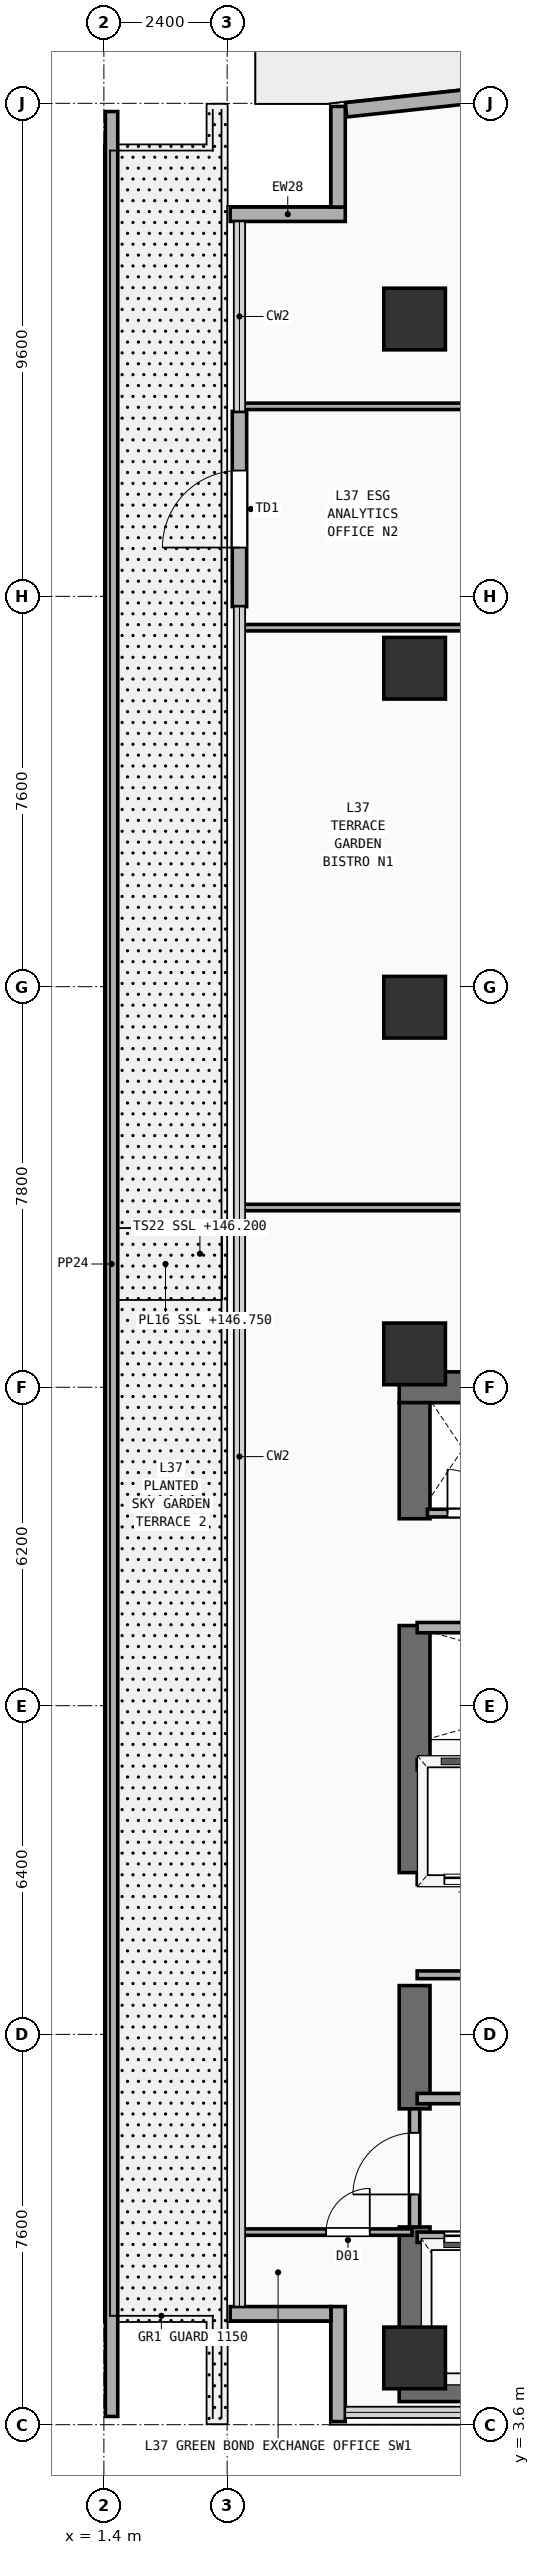
"""IFC4 building model, lengths in metres.
Left out: names, types, materials, properties, quantities, classifications, styles, units other than length and angle.
Written with IfcOpenShell. Run it as: python <this file> out.ifc"""

import sys

from ifc_helpers import new_model, si_unit, direction, frame, frame_2d, origin, origin_2d, place, context, subcontext, project, spatial, rectangle, extrude, element, fill, save


model = new_model("IFC4")
c1 = context("Model", 3, precision=1e-05, world=origin(), true_north=direction((0.0, 1.0)))
c2 = subcontext(c1, "Body", "Model", "MODEL_VIEW")
j1 = project(units=[si_unit("LENGTHUNIT", "METRE"), si_unit("PLANEANGLEUNIT", "RADIAN")], contexts=[c1])
p1 = place(None, origin())
s1 = spatial("IfcSite", under=j1, at=p1, CompositionType="ELEMENT")
p2 = place(p1, origin())
s2 = spatial("IfcBuilding", under=s1, at=p2, CompositionType="ELEMENT")
p3 = place(p2, frame((0.0, 0.0, 146.2)))
s3 = spatial("IfcBuildingStorey", under=s2, at=p3, CompositionType="ELEMENT", Elevation=146.2)
for number, where, z_axis, x_axis in (
    (1, (7.15, 4.35, 0.0), (0.0, 0.0, 1.0), (1.0, 0.0, 0.0)),
    (2, (7.15, 23.8, 0.0), (0.0, 0.0, 1.0), (1.0, 0.0, 0.0)),
):
    element("IfcWall", number, at=place(p3, frame(where, z_axis=z_axis, x_axis=x_axis)), inside=s3, PredefinedType="SHEAR", context=c2, shape_type="SweptSolid", body=[
        extrude(rectangle(XDim=13.95, YDim=0.6, at=frame_2d((6.975, 0.0))), origin(), (0.0, 0.0, 1.0), 3.56),
    ])
p4 = place(p3, frame((7.45, 4.65, 0.0), z_axis=(0.0, 0.0, 1.0), x_axis=(0.0, 1.0, 0.0)))
e3 = element("IfcWall", 3, at=p4, inside=s3, PredefinedType="SHEAR", context=c2, shape_type="SweptSolid", body=[
    extrude(rectangle(XDim=2.8, YDim=0.6, at=frame_2d((1.4, 0.0))), origin(), (0.0, 0.0, 1.0), 3.56),
])
p5 = place(p3, frame((7.45, 9.75, 0.0), z_axis=(0.0, 0.0, 1.0), x_axis=(0.0, 1.0, 0.0)))
e4 = element("IfcWall", 4, at=p5, inside=s3, PredefinedType="SHEAR", context=c2, shape_type="SweptSolid", body=[
    extrude(rectangle(XDim=2.4, YDim=0.6, at=frame_2d((1.2, 0.0))), origin(), (0.0, 0.0, 1.0), 3.56),
])
p6 = place(p3, frame((7.45, 14.35, 0.0), z_axis=(0.0, 0.0, 1.0), x_axis=(0.0, 1.0, 0.0)))
e5 = element("IfcWall", 5, at=p6, inside=s3, PredefinedType="SHEAR", context=c2, shape_type="SweptSolid", body=[
    extrude(rectangle(XDim=4.81, YDim=0.6, at=frame_2d((2.405, 0.0))), origin(), (0.0, 0.0, 1.0), 3.56),
])
p7 = place(p3, frame((7.45, 21.24, 0.0), z_axis=(0.0, 0.0, 1.0), x_axis=(0.0, 1.0, 0.0)))
e6 = element("IfcWall", 6, at=p7, inside=s3, PredefinedType="SHEAR", context=c2, shape_type="SweptSolid", body=[
    extrude(rectangle(XDim=2.26, YDim=0.6, at=frame_2d((1.13, 0.0))), origin(), (0.0, 0.0, 1.0), 3.56),
])
for number, where, z_axis, x_axis in (
    (7, (7.45, 4.9, 0.0), (0.0, 0.0, 1.0), (1.0, 0.0, 0.0)),
    (8, (7.45, 24.45, 0.0), (0.0, 0.0, 1.0), (1.0, 0.0, 0.0)),
    (9, (7.45, 31.2, 0.0), (0.0, 0.0, 1.0), (1.0, 0.0, 0.0)),
    (10, (7.45, 37.8, 0.0), (0.0, 0.0, 1.0), (1.0, 0.0, 0.0)),
    (11, (7.45, 44.6, 0.0), (0.0, 0.0, 1.0), (1.0, 0.0, 0.0)),
):
    element("IfcColumn", number, at=place(p3, frame(where, z_axis=z_axis, x_axis=x_axis)), inside=s3, PredefinedType="COLUMN", context=c2, shape_type="SweptSolid", body=[
        extrude(rectangle(XDim=1.2, YDim=1.2, at=origin_2d()), origin(), (0.0, 0.0, 1.0), 3.56),
    ])
p8 = place(p3, frame((4.04, 39.0, 0.0), z_axis=(0.0, 0.0, 1.0), x_axis=(0.0, 1.0, 0.0)))
e12 = element("IfcWall", 12, at=p8, inside=s3, PredefinedType="SOLIDWALL", context=c2, shape_type="SweptSolid", body=[
    extrude(rectangle(XDim=3.8, YDim=0.28, at=frame_2d((1.9, 0.0))), origin(), (0.0, 0.0, 1.0), 3.56),
])
p9 = place(p8, frame((1.15, 0.0, 0.0)))
e13 = element("IfcOpeningElement", 13, at=p9, cuts=e12, PredefinedType="OPENING", context=c2, shape_type="SweptSolid", body=[
    extrude(rectangle(XDim=1.5, YDim=2.25, at=frame_2d((0.75, 1.125))), frame((0.0, 0.15, 0.0), z_axis=(0.0, -1.0, 0.0), x_axis=(1.0, 0.0, 0.0)), (0.0, 0.0, 1.0), 0.3),
])
p10 = place(p3, frame((1.55, 3.76, 0.0), z_axis=(0.0, 0.0, 1.0), x_axis=(0.0, 1.0, 0.0)))
e14 = element("IfcWall", 14, at=p10, inside=s3, PredefinedType="PARAPET", context=c2, shape_type="SweptSolid", body=[
    extrude(rectangle(XDim=44.88, YDim=0.24, at=frame_2d((22.44, 0.0))), origin(), (0.0, 0.0, 1.0), 0.42),
])
p11 = place(p3, frame((5.96, 3.66, 0.0), z_axis=(0.0, 0.0, 1.0), x_axis=(0.0, 1.0, 0.0)))
e15 = element("IfcWall", 15, at=p11, inside=s3, PredefinedType="SOLIDWALL", context=c2, shape_type="SweptSolid", body=[
    extrude(rectangle(XDim=2.24, YDim=0.28, at=frame_2d((1.12, 0.0))), origin(), (0.0, 0.0, 1.0), 3.56),
])
p12 = place(p3, frame((3.86, 5.76, 0.0), z_axis=(0.0, 0.0, 1.0), x_axis=(1.0, 0.0, 0.0)))
e16 = element("IfcWall", 16, at=p12, inside=s3, PredefinedType="SOLIDWALL", context=c2, shape_type="SweptSolid", body=[
    extrude(rectangle(XDim=1.96, YDim=0.28, at=frame_2d((0.98, 0.0))), origin(), (0.0, 0.0, 1.0), 3.56),
])
p13 = place(p3, frame((3.86, 46.64, 0.0), z_axis=(0.0, 0.0, 1.0), x_axis=(1.0, 0.0, 0.0)))
e17 = element("IfcWall", 17, at=p13, inside=s3, PredefinedType="SOLIDWALL", context=c2, shape_type="SweptSolid", body=[
    extrude(rectangle(XDim=2.24, YDim=0.28, at=frame_2d((1.12, 0.0))), origin(), (0.0, 0.0, 1.0), 3.56),
])
p14 = place(p3, frame((5.96, 46.78, 0.0), z_axis=(0.0, 0.0, 1.0), x_axis=(0.0, 1.0, 0.0)))
e18 = element("IfcWall", 18, at=p14, inside=s3, PredefinedType="SOLIDWALL", context=c2, shape_type="SweptSolid", body=[
    extrude(rectangle(XDim=1.96, YDim=0.28, at=frame_2d((0.98, 0.0))), origin(), (0.0, 0.0, 1.0), 3.56),
])
p15 = place(p3, frame((13.197, 49.439, 0.0), z_axis=(0.0, 0.0, 1.0), x_axis=(-0.994206651606, -0.107485505548, 0.0)))
e19 = element("IfcWall", 19, at=p15, inside=s3, PredefinedType="SOLIDWALL", context=c2, shape_type="SweptSolid", body=[
    extrude(rectangle(XDim=7.123, YDim=0.28, at=frame_2d((3.562, 0.0))), origin(), (0.0, 0.0, 1.0), 3.56),
])
p16 = place(p3, frame((7.5, 7.25, 0.0), z_axis=(0.0, 0.0, 1.0), x_axis=(1.0, 0.0, 0.0)))
e20 = element("IfcWall", 20, at=p16, inside=s3, PredefinedType="PARTITIONING", context=c2, shape_type="SweptSolid", body=[
    extrude(rectangle(XDim=8.35, YDim=0.2, at=frame_2d((4.175, 0.0))), origin(), (0.0, 0.0, 1.0), 3.56),
])
p17 = place(p16, frame((0.53, 0.0, 0.0)))
e21 = element("IfcOpeningElement", 21, at=p17, cuts=e20, PredefinedType="OPENING", context=c2, shape_type="SweptSolid", body=[
    extrude(rectangle(XDim=1.1, YDim=2.2, at=frame_2d((0.55, 1.1))), frame((0.0, 0.11, 0.0), z_axis=(0.0, -1.0, 0.0), x_axis=(1.0, 0.0, 0.0)), (0.0, 0.0, 1.0), 0.22),
])
p18 = place(p16, frame((2.37, 0.0, 0.0)))
e22 = element("IfcOpeningElement", 22, at=p18, cuts=e20, PredefinedType="OPENING", context=c2, shape_type="SweptSolid", body=[
    extrude(rectangle(XDim=1.1, YDim=2.2, at=frame_2d((0.55, 1.1))), frame((0.0, 0.11, 0.0), z_axis=(0.0, -1.0, 0.0), x_axis=(1.0, 0.0, 0.0)), (0.0, 0.0, 1.0), 0.22),
])
p19 = place(p16, frame((4.33, 0.0, 0.0)))
e23 = element("IfcOpeningElement", 23, at=p19, cuts=e20, PredefinedType="OPENING", context=c2, shape_type="SweptSolid", body=[
    extrude(rectangle(XDim=1.1, YDim=2.2, at=frame_2d((0.55, 1.1))), frame((0.0, 0.11, 0.0), z_axis=(0.0, -1.0, 0.0), x_axis=(1.0, 0.0, 0.0)), (0.0, 0.0, 1.0), 0.22),
])
p20 = place(p16, frame((6.5, 0.0, 0.0)))
e24 = element("IfcOpeningElement", 24, at=p20, cuts=e20, PredefinedType="OPENING", context=c2, shape_type="SweptSolid", body=[
    extrude(rectangle(XDim=1.1, YDim=2.2, at=frame_2d((0.55, 1.1))), frame((0.0, 0.11, 0.0), z_axis=(0.0, -1.0, 0.0), x_axis=(1.0, 0.0, 0.0)), (0.0, 0.0, 1.0), 0.22),
])
p21 = place(p3, frame((7.5, 9.95, 0.0), z_axis=(0.0, 0.0, 1.0), x_axis=(1.0, 0.0, 0.0)))
e25 = element("IfcWall", 25, at=p21, inside=s3, PredefinedType="PARTITIONING", context=c2, shape_type="SweptSolid", body=[
    extrude(rectangle(XDim=8.35, YDim=0.2, at=frame_2d((4.175, 0.0))), origin(), (0.0, 0.0, 1.0), 3.56),
])
p22 = place(p3, frame((7.45, 7.45, 0.0), z_axis=(0.0, 0.0, 1.0), x_axis=(0.0, 1.0, 0.0)))
e26 = element("IfcWall", 26, at=p22, inside=s3, PredefinedType="PARTITIONING", context=c2, shape_type="SweptSolid", body=[
    extrude(rectangle(XDim=2.3, YDim=0.2, at=frame_2d((1.15, 0.0))), origin(), (0.0, 0.0, 1.0), 2.54),
])
p23 = place(p22, frame((0.633, 0.0, 0.0)))
e27 = element("IfcOpeningElement", 27, at=p23, cuts=e26, PredefinedType="OPENING", context=c2, shape_type="SweptSolid", body=[
    extrude(rectangle(XDim=1.2, YDim=2.25, at=frame_2d((0.6, 1.125))), frame((0.0, 0.11, 0.0), z_axis=(0.0, -1.0, 0.0), x_axis=(1.0, 0.0, 0.0)), (0.0, 0.0, 1.0), 0.22),
])
p24 = place(p3, frame((7.5, 12.36, 0.0), z_axis=(0.0, 0.0, 1.0), x_axis=(1.0, 0.0, 0.0)))
e28 = element("IfcWall", 28, at=p24, inside=s3, PredefinedType="PARTITIONING", context=c2, shape_type="SweptSolid", body=[
    extrude(rectangle(XDim=7.85, YDim=0.15, at=frame_2d((3.925, 0.0))), origin(), (0.0, 0.0, 1.0), 3.56),
])
p25 = place(p24, frame((2.202, 0.0, 0.0)))
e29 = element("IfcOpeningElement", 29, at=p25, cuts=e28, PredefinedType="OPENING", context=c2, shape_type="SweptSolid", body=[
    extrude(rectangle(XDim=0.85, YDim=2.15, at=frame_2d((0.425, 1.075))), frame((0.0, 0.085, 0.0), z_axis=(0.0, -1.0, 0.0), x_axis=(1.0, 0.0, 0.0)), (0.0, 0.0, 1.0), 0.17),
])
p26 = place(p24, frame((6.025, 0.0, 0.0)))
e30 = element("IfcOpeningElement", 30, at=p26, cuts=e28, PredefinedType="OPENING", context=c2, shape_type="SweptSolid", body=[
    extrude(rectangle(XDim=0.85, YDim=2.15, at=frame_2d((0.425, 1.075))), frame((0.0, 0.085, 0.0), z_axis=(0.0, -1.0, 0.0), x_axis=(1.0, 0.0, 0.0)), (0.0, 0.0, 1.0), 0.17),
])
p27 = place(p3, frame((7.5, 14.22, 0.0), z_axis=(0.0, 0.0, 1.0), x_axis=(1.0, 0.0, 0.0)))
e31 = element("IfcWall", 31, at=p27, inside=s3, PredefinedType="PARTITIONING", context=c2, shape_type="SweptSolid", body=[
    extrude(rectangle(XDim=7.85, YDim=0.2, at=frame_2d((3.925, 0.0))), origin(), (0.0, 0.0, 1.0), 3.56),
])
p28 = place(p27, frame((0.53, 0.0, 0.0)))
e32 = element("IfcOpeningElement", 32, at=p28, cuts=e31, PredefinedType="OPENING", context=c2, shape_type="SweptSolid", body=[
    extrude(rectangle(XDim=1.1, YDim=2.2, at=frame_2d((0.55, 1.1))), frame((0.0, 0.11, 0.0), z_axis=(0.0, -1.0, 0.0), x_axis=(1.0, 0.0, 0.0)), (0.0, 0.0, 1.0), 0.22),
])
p29 = place(p27, frame((2.42, 0.0, 0.0)))
e33 = element("IfcOpeningElement", 33, at=p29, cuts=e31, PredefinedType="OPENING", context=c2, shape_type="SweptSolid", body=[
    extrude(rectangle(XDim=1.1, YDim=2.2, at=frame_2d((0.55, 1.1))), frame((0.0, 0.11, 0.0), z_axis=(0.0, -1.0, 0.0), x_axis=(1.0, 0.0, 0.0)), (0.0, 0.0, 1.0), 0.22),
])
p30 = place(p27, frame((4.31, 0.0, 0.0)))
e34 = element("IfcOpeningElement", 34, at=p30, cuts=e31, PredefinedType="OPENING", context=c2, shape_type="SweptSolid", body=[
    extrude(rectangle(XDim=1.1, YDim=2.2, at=frame_2d((0.55, 1.1))), frame((0.0, 0.11, 0.0), z_axis=(0.0, -1.0, 0.0), x_axis=(1.0, 0.0, 0.0)), (0.0, 0.0, 1.0), 0.22),
])
p31 = place(p27, frame((6.2, 0.0, 0.0)))
e35 = element("IfcOpeningElement", 35, at=p31, cuts=e31, PredefinedType="OPENING", context=c2, shape_type="SweptSolid", body=[
    extrude(rectangle(XDim=1.1, YDim=2.2, at=frame_2d((0.55, 1.1))), frame((0.0, 0.11, 0.0), z_axis=(0.0, -1.0, 0.0), x_axis=(1.0, 0.0, 0.0)), (0.0, 0.0, 1.0), 0.22),
])
for number, where, z_axis, x_axis in (
    (36, (7.5, 16.45, 0.0), (0.0, 0.0, 1.0), (1.0, 0.0, 0.0)),
    (37, (7.5, 19.12, 0.0), (0.0, 0.0, 1.0), (1.0, 0.0, 0.0)),
):
    element("IfcWall", number, at=place(p3, frame(where, z_axis=z_axis, x_axis=x_axis)), inside=s3, PredefinedType="PARTITIONING", context=c2, shape_type="SweptSolid", body=[
        extrude(rectangle(XDim=7.85, YDim=0.2, at=frame_2d((3.925, 0.0))), origin(), (0.0, 0.0, 1.0), 3.56),
    ])
p32 = place(p3, frame((7.7, 21.35, 0.0), z_axis=(0.0, 0.0, 1.0), x_axis=(1.0, 0.0, 0.0)))
e38 = element("IfcWall", 38, at=p32, inside=s3, PredefinedType="PARTITIONING", context=c2, shape_type="SweptSolid", body=[
    extrude(rectangle(XDim=1.55, YDim=0.15, at=frame_2d((0.775, 0.0))), origin(), (0.0, 0.0, 1.0), 3.56),
])
p33 = place(p32, frame((0.39, 0.0, 0.0)))
e39 = element("IfcOpeningElement", 39, at=p33, cuts=e38, PredefinedType="OPENING", context=c2, shape_type="SweptSolid", body=[
    extrude(rectangle(XDim=0.85, YDim=2.15, at=frame_2d((0.425, 1.075))), frame((0.0, 0.085, 0.0), z_axis=(0.0, -1.0, 0.0), x_axis=(1.0, 0.0, 0.0)), (0.0, 0.0, 1.0), 0.17),
])
p34 = place(p3, frame((4.04, 7.35, 0.0), z_axis=(0.0, 0.0, 1.0), x_axis=(1.0, 0.0, 0.0)))
e40 = element("IfcWall", 40, at=p34, inside=s3, PredefinedType="PARTITIONING", context=c2, shape_type="SweptSolid", body=[
    extrude(rectangle(XDim=3.36, YDim=0.125, at=frame_2d((1.68, 0.0))), origin(), (0.0, 0.0, 1.0), 3.56),
])
p35 = place(p34, frame((1.687, 0.0, 0.0)))
e41 = element("IfcOpeningElement", 41, at=p35, cuts=e40, PredefinedType="OPENING", context=c2, shape_type="SweptSolid", body=[
    extrude(rectangle(XDim=0.85, YDim=2.15, at=frame_2d((0.425, 1.075))), frame((0.0, 0.073, 0.0), z_axis=(0.0, -1.0, 0.0), x_axis=(1.0, 0.0, 0.0)), (0.0, 0.0, 1.0), 0.145),
])
for number, where, z_axis, x_axis in (
    (42, (4.04, 27.3, 0.0), (0.0, 0.0, 1.0), (1.0, 0.0, 0.0)),
    (43, (4.04, 38.59, 0.0), (0.0, 0.0, 1.0), (1.0, 0.0, 0.0)),
):
    element("IfcWall", number, at=place(p3, frame(where, z_axis=z_axis, x_axis=x_axis)), inside=s3, PredefinedType="PARTITIONING", context=c2, shape_type="SweptSolid", body=[
        extrude(rectangle(XDim=6.16, YDim=0.125, at=frame_2d((3.08, 0.0))), origin(), (0.0, 0.0, 1.0), 3.56),
    ])
p36 = place(p3, frame((4.04, 42.9, 0.0), z_axis=(0.0, 0.0, 1.0), x_axis=(1.0, 0.0, 0.0)))
e44 = element("IfcWall", 44, at=p36, inside=s3, PredefinedType="PARTITIONING", context=c2, shape_type="SweptSolid", body=[
    extrude(rectangle(XDim=18.32, YDim=0.125, at=frame_2d((9.16, 0.0))), origin(), (0.0, 0.0, 1.0), 3.56),
])
p37 = place(p36, frame((6.56, 0.0, 0.0)))
e45 = element("IfcOpeningElement", 45, at=p37, cuts=e44, PredefinedType="OPENING", context=c2, shape_type="SweptSolid", body=[
    extrude(rectangle(XDim=1.0, YDim=2.2, at=frame_2d((0.5, 1.1))), frame((0.0, 0.073, 0.0), z_axis=(0.0, -1.0, 0.0), x_axis=(1.0, 0.0, 0.0)), (0.0, 0.0, 1.0), 0.145),
])
p38 = place(p9, origin())
e46 = element("IfcDoor", 46, at=p38, inside=s3, OperationType="SINGLE_SWING_LEFT", PredefinedType="DOOR", context=c2, shape_type="SweptSolid", body=[
    extrude(rectangle(XDim=1.5, YDim=2.25, at=frame_2d((0.75, 1.125))), frame((0.0, 0.025, 0.0), z_axis=(0.0, -1.0, 0.0), x_axis=(1.0, 0.0, 0.0)), (0.0, 0.0, 1.0), 0.05),
])
fill(e13, e46)
p39 = place(p17, origin())
e47 = element("IfcDoor", 47, at=p39, inside=s3, OperationType="SLIDING_TO_LEFT", PredefinedType="DOOR", context=c2, shape_type="SweptSolid", body=[
    extrude(rectangle(XDim=1.1, YDim=2.2, at=frame_2d((0.55, 1.1))), frame((0.0, 0.025, 0.0), z_axis=(0.0, -1.0, 0.0), x_axis=(1.0, 0.0, 0.0)), (0.0, 0.0, 1.0), 0.05),
])
fill(e21, e47)
p40 = place(p23, frame((1.2, 0.0, 0.0), z_axis=(0.0, 0.0, 1.0), x_axis=(-1.0, 0.0, 0.0)))
e48 = element("IfcDoor", 48, at=p40, inside=s3, OperationType="SINGLE_SWING_RIGHT", PredefinedType="DOOR", context=c2, shape_type="SweptSolid", body=[
    extrude(rectangle(XDim=1.2, YDim=2.25, at=frame_2d((0.6, 1.125))), frame((0.0, 0.025, 0.0), z_axis=(0.0, -1.0, 0.0), x_axis=(1.0, 0.0, 0.0)), (0.0, 0.0, 1.0), 0.05),
])
fill(e27, e48)
p41 = place(p28, frame((1.1, 0.0, 0.0), z_axis=(0.0, 0.0, 1.0), x_axis=(-1.0, 0.0, 0.0)))
e49 = element("IfcDoor", 49, at=p41, inside=s3, OperationType="SLIDING_TO_LEFT", PredefinedType="DOOR", context=c2, shape_type="SweptSolid", body=[
    extrude(rectangle(XDim=1.1, YDim=2.2, at=frame_2d((0.55, 1.1))), frame((0.0, 0.025, 0.0), z_axis=(0.0, -1.0, 0.0), x_axis=(1.0, 0.0, 0.0)), (0.0, 0.0, 1.0), 0.05),
])
fill(e32, e49)
p42 = place(p33, origin())
e50 = element("IfcDoor", 50, at=p42, inside=s3, OperationType="SINGLE_SWING_LEFT", PredefinedType="DOOR", context=c2, shape_type="SweptSolid", body=[
    extrude(rectangle(XDim=0.85, YDim=2.15, at=frame_2d((0.425, 1.075))), frame((0.0, 0.025, 0.0), z_axis=(0.0, -1.0, 0.0), x_axis=(1.0, 0.0, 0.0)), (0.0, 0.0, 1.0), 0.05),
])
fill(e39, e50)
p43 = place(p35, origin())
e51 = element("IfcDoor", 51, at=p43, inside=s3, OperationType="SINGLE_SWING_RIGHT", PredefinedType="DOOR", context=c2, shape_type="SweptSolid", body=[
    extrude(rectangle(XDim=0.85, YDim=2.15, at=frame_2d((0.425, 1.075))), frame((0.0, 0.025, 0.0), z_axis=(0.0, -1.0, 0.0), x_axis=(1.0, 0.0, 0.0)), (0.0, 0.0, 1.0), 0.05),
])
fill(e41, e51)
save(model, sys.argv[1])
